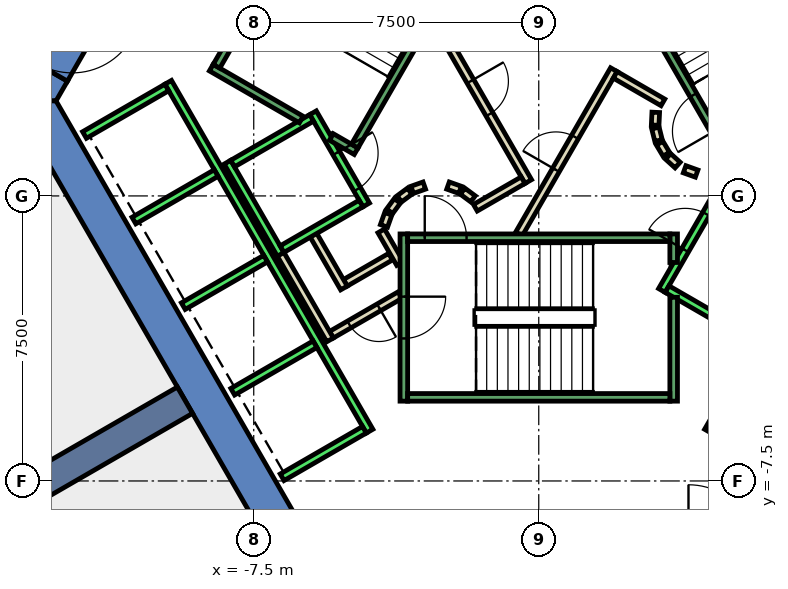
"""IFC4 building model, lengths in metres.
Left out: names, types, materials, properties, quantities, classifications, styles, units other than length and angle.
Written with IfcOpenShell. Run it as: python <this file> out.ifc"""

import sys

from ifc_helpers import new_model, si_unit, direction, frame, frame_2d, origin, place, context, subcontext, project, spatial, polyline, rectangle, outline, extrude, element, fill, save


model = new_model("IFC4")
c1 = context("Model", 3, precision=1e-05, world=origin(), true_north=direction((0.0, 1.0)))
c2 = subcontext(c1, "Body", "Model", "MODEL_VIEW")
j1 = project(units=[si_unit("LENGTHUNIT", "METRE"), si_unit("PLANEANGLEUNIT", "RADIAN")], contexts=[c1])
p1 = place(None, origin())
s1 = spatial("IfcSite", under=j1, at=p1, CompositionType="ELEMENT")
p2 = place(p1, origin())
s2 = spatial("IfcBuilding", under=s1, at=p2, CompositionType="ELEMENT")
p3 = place(p2, frame((0.0, 0.0, 56.0)))
s3 = spatial("IfcBuildingStorey", under=s2, at=p3, CompositionType="ELEMENT", Elevation=56.0)
p4 = place(p3, frame((0.0, 0.0, -0.4)))
e1 = element("IfcWall", 1, at=p4, inside=s3, PredefinedType="SHEAR", context=c2, shape_type="SweptSolid", body=[
    extrude(outline(polyline([(-12.402, 3.02), (-13.267, 3.52), (-13.856, 2.5), (-12.702, 2.5), (-12.402, 3.02)])), origin(), (0.0, 0.0, 1.0), 4.2),
])
p5 = place(p3, frame((0.0, 0.0, 3.6)))
e2 = element("IfcWall", 2, at=p5, inside=s3, PredefinedType="SHEAR", context=c2, shape_type="SweptSolid", body=[
    extrude(outline(polyline([(-13.267, 3.52), (-12.402, 3.02), (-11.402, 4.752), (-12.267, 5.252), (-13.267, 3.52)])), origin(), (0.0, 0.0, 1.0), 0.2),
])
p6 = place(p3, frame((0.0, 0.0, -0.4)))
e3 = element("IfcWall", 3, at=p6, inside=s3, PredefinedType="SHEAR", context=c2, shape_type="SweptSolid", body=[
    extrude(outline(polyline([(-13.856, 2.5), (-6.928, -9.5), (-6.351, -8.5), (-12.702, 2.5), (-13.856, 2.5)])), origin(), (0.0, 0.0, 1.0), 4.2),
])
p7 = place(p3, frame((-9.31, -5.375, -0.4), z_axis=(0.0, 0.0, 1.0), x_axis=(-0.866017533419, -0.500013631625, 0.0)))
e4 = element("IfcWall", 4, at=p7, inside=s3, PredefinedType="SHEAR", context=c2, shape_type="SweptSolid", body=[
    extrude(rectangle(XDim=9.0, YDim=0.8, at=frame_2d((4.5, 0.0))), origin(), (0.0, 0.0, 1.0), 4.2),
])
p8 = place(p3, frame((-3.9, -1.599, 0.0), z_axis=(0.0, 0.0, 1.0), x_axis=(-0.865969445389, -0.500096910261, 0.0)))
e5 = element("IfcWall", 5, at=p8, inside=s3, PredefinedType="PARTITIONING", context=c2, shape_type="SweptSolid", body=[
    extrude(rectangle(XDim=1.373, YDim=0.2, at=frame_2d((0.687, 0.0))), origin(), (0.0, 0.0, 1.0), 3.8),
])
p9 = place(p3, frame((-5.126, -2.422, 0.0), z_axis=(0.0, 0.0, 1.0), x_axis=(-0.500062241894, 0.865989465428, 0.0)))
e6 = element("IfcWall", 6, at=p9, inside=s3, PredefinedType="PARTITIONING", context=c2, shape_type="SweptSolid", body=[
    extrude(rectangle(XDim=1.7, YDim=0.2, at=frame_2d((0.85, 0.0))), origin(), (0.0, 0.0, 1.0), 3.8),
])
p10 = place(p3, frame((-3.65, -2.61, 0.0), z_axis=(0.0, 0.0, 1.0), x_axis=(-0.866072462134, -0.499918483688, 0.0)))
e7 = element("IfcWall", 7, at=p10, inside=s3, PredefinedType="PARTITIONING", context=c2, shape_type="SweptSolid", body=[
    extrude(rectangle(XDim=2.084, YDim=0.2, at=frame_2d((1.042, 0.0))), origin(), (0.0, 0.0, 1.0), 3.8),
])
p11 = place(p10, frame((0.642, 0.0, 0.0)))
e8 = element("IfcOpeningElement", 8, at=p11, cuts=e7, PredefinedType="OPENING", context=c2, shape_type="SweptSolid", body=[
    extrude(rectangle(XDim=0.9, YDim=2.1, at=frame_2d((0.45, 1.05))), frame((0.0, 0.11, 0.0), z_axis=(0.0, -1.0, 0.0), x_axis=(1.0, 0.0, 0.0)), (0.0, 0.0, 1.0), 0.22),
])
p12 = place(p3, frame((-5.492, -3.788, 0.0), z_axis=(0.0, 0.0, 1.0), x_axis=(-0.500008949224, 0.866020236886, 0.0)))
e9 = element("IfcWall", 9, at=p12, inside=s3, PredefinedType="PARTITIONING", context=c2, shape_type="SweptSolid", body=[
    extrude(rectangle(XDim=2.68, YDim=0.2, at=frame_2d((1.34, 0.0))), origin(), (0.0, 0.0, 1.0), 3.8),
])
p13 = place(p3, frame((-4.145, -0.92, 0.0), z_axis=(0.0, 0.0, 1.0), x_axis=(0.499743786207, -0.866173278362, 0.0)))
e10 = element("IfcWall", 10, at=p13, inside=s3, PredefinedType="PARTITIONING", context=c2, shape_type="SweptSolid", body=[
    extrude(rectangle(XDim=0.991, YDim=0.2, at=frame_2d((0.495, 0.0))), origin(), (0.0, 0.0, 1.0), 3.8),
])
p14 = place(p3, frame((-0.52, -1.0, 0.0), z_axis=(0.0, 0.0, 1.0), x_axis=(0.50011622646, 0.865958290007, 0.0)))
e11 = element("IfcWall", 11, at=p14, inside=s3, PredefinedType="PARTITIONING", context=c2, shape_type="SweptSolid", body=[
    extrude(rectangle(XDim=4.991, YDim=0.2, at=frame_2d((2.496, 0.0))), origin(), (0.0, 0.0, 1.0), 3.8),
])
p15 = place(p14, frame((1.945, 0.0, 0.0)))
e12 = element("IfcOpeningElement", 12, at=p15, cuts=e11, PredefinedType="OPENING", context=c2, shape_type="SweptSolid", body=[
    extrude(rectangle(XDim=1.0, YDim=2.1, at=frame_2d((0.5, 1.05))), frame((0.0, 0.11, 0.0), z_axis=(0.0, -1.0, 0.0), x_axis=(1.0, 0.0, 0.0)), (0.0, 0.0, 1.0), 0.22),
])
p16 = place(p3, frame((2.012, 3.186, 0.0), z_axis=(0.0, 0.0, 1.0), x_axis=(0.865891012941, -0.500232699559, 0.0)))
e13 = element("IfcWall", 13, at=p16, inside=s3, PredefinedType="PARTITIONING", context=c2, shape_type="SweptSolid", body=[
    extrude(rectangle(XDim=1.449, YDim=0.2, at=frame_2d((0.725, 0.0))), origin(), (0.0, 0.0, 1.0), 3.8),
])
p17 = place(p3, frame((3.079, 2.199, 0.0), z_axis=(0.0, 0.0, 1.0), x_axis=(-0.047771483479, -0.998858290933, 0.0)))
e14 = element("IfcWall", 14, at=p17, inside=s3, PredefinedType="PARTITIONING", context=c2, shape_type="SweptSolid", body=[
    extrude(rectangle(XDim=0.337, YDim=0.2, at=frame_2d((0.169, 0.0))), origin(), (0.0, 0.0, 1.0), 3.8),
])
p18 = place(p3, frame((3.07, 1.786, 0.0), z_axis=(0.0, 0.0, 1.0), x_axis=(0.242705583207, -0.970099994784, 0.0)))
e15 = element("IfcWall", 15, at=p18, inside=s3, PredefinedType="PARTITIONING", context=c2, shape_type="SweptSolid", body=[
    extrude(rectangle(XDim=0.338, YDim=0.2, at=frame_2d((0.169, 0.0))), origin(), (0.0, 0.0, 1.0), 3.8),
])
for number, where, z_axis, x_axis in (
    (16, (3.182, 1.388, 0.0), (0.0, 0.0, 1.0), (0.512, -0.859, 0.0)),
    (17, (3.404, 1.039, 0.0), (0.0, 0.0, 1.0), (0.74, -0.672, 0.0)),
):
    element("IfcWall", number, at=place(p3, frame(where, z_axis=z_axis, x_axis=x_axis)), inside=s3, PredefinedType="PARTITIONING", context=c2, shape_type="SweptSolid", body=[
        extrude(rectangle(XDim=0.338, YDim=0.2, at=frame_2d((0.169, 0.0))), origin(), (0.0, 0.0, 1.0), 3.8),
    ])
p19 = place(p3, frame((3.838, 0.702, 0.0), z_axis=(0.0, 0.0, 1.0), x_axis=(0.941035081519, -0.338308993895, 0.0)))
e18 = element("IfcWall", 18, at=p19, inside=s3, PredefinedType="PARTITIONING", context=c2, shape_type="SweptSolid", body=[
    extrude(rectangle(XDim=0.337, YDim=0.2, at=frame_2d((0.168, 0.0))), origin(), (0.0, 0.0, 1.0), 3.8),
])
p20 = place(p3, frame((-2.771, 4.7, 0.0), z_axis=(0.0, 0.0, 1.0), x_axis=(0.499969479948, -0.866043023828, 0.0)))
e19 = element("IfcWall", 19, at=p20, inside=s3, PredefinedType="PARTITIONING", context=c2, shape_type="SweptSolid", body=[
    extrude(rectangle(XDim=4.99, YDim=0.2, at=frame_2d((2.495, 0.0))), origin(), (0.0, 0.0, 1.0), 3.8),
])
p21 = place(p20, frame((1.945, 0.0, 0.0)))
e20 = element("IfcOpeningElement", 20, at=p21, cuts=e19, PredefinedType="OPENING", context=c2, shape_type="SweptSolid", body=[
    extrude(rectangle(XDim=1.0, YDim=2.1, at=frame_2d((0.5, 1.05))), frame((0.0, 0.11, 0.0), z_axis=(0.0, -1.0, 0.0), x_axis=(1.0, 0.0, 0.0)), (0.0, 0.0, 1.0), 0.22),
])
p22 = place(p3, frame((-0.412, 0.414, 0.0), z_axis=(0.0, 0.0, 1.0), x_axis=(-0.866017369001, -0.500013916395, 0.0)))
e21 = element("IfcWall", 21, at=p22, inside=s3, PredefinedType="PARTITIONING", context=c2, shape_type="SweptSolid", body=[
    extrude(rectangle(XDim=1.45, YDim=0.2, at=frame_2d((0.725, 0.0))), origin(), (0.0, 0.0, 1.0), 3.8),
])
p23 = place(p3, frame((-1.731, -0.077, 0.0), z_axis=(0.0, 0.0, 1.0), x_axis=(-0.804311165252, 0.594208338422, 0.0)))
e22 = element("IfcWall", 22, at=p23, inside=s3, PredefinedType="PARTITIONING", context=c2, shape_type="SweptSolid", body=[
    extrude(rectangle(XDim=0.338, YDim=0.2, at=frame_2d((0.169, 0.0))), origin(), (0.0, 0.0, 1.0), 3.8),
])
p24 = place(p3, frame((-2.07, 0.16, 0.0), z_axis=(0.0, 0.0, 1.0), x_axis=(-0.942199461132, 0.335052496547, 0.0)))
e23 = element("IfcWall", 23, at=p24, inside=s3, PredefinedType="PARTITIONING", context=c2, shape_type="SweptSolid", body=[
    extrude(rectangle(XDim=0.337, YDim=0.2, at=frame_2d((0.169, 0.0))), origin(), (0.0, 0.0, 1.0), 3.8),
])
p25 = place(p3, frame((-3.012, 0.273, 0.0), z_axis=(0.0, 0.0, 1.0), x_axis=(-0.942280615813, -0.334824194261, 0.0)))
e24 = element("IfcWall", 24, at=p25, inside=s3, PredefinedType="PARTITIONING", context=c2, shape_type="SweptSolid", body=[
    extrude(rectangle(XDim=0.338, YDim=0.2, at=frame_2d((0.169, 0.0))), origin(), (0.0, 0.0, 1.0), 3.8),
])
p26 = place(p3, frame((-3.397, 0.124, 0.0), z_axis=(0.0, 0.0, 1.0), x_axis=(-0.804311165252, -0.594208338422, 0.0)))
e25 = element("IfcWall", 25, at=p26, inside=s3, PredefinedType="PARTITIONING", context=c2, shape_type="SweptSolid", body=[
    extrude(rectangle(XDim=0.338, YDim=0.2, at=frame_2d((0.169, 0.0))), origin(), (0.0, 0.0, 1.0), 3.8),
])
p27 = place(p3, frame((-3.723, -0.131, 0.0), z_axis=(0.0, 0.0, 1.0), x_axis=(-0.594675113454, -0.803966112121, 0.0)))
e26 = element("IfcWall", 26, at=p27, inside=s3, PredefinedType="PARTITIONING", context=c2, shape_type="SweptSolid", body=[
    extrude(rectangle(XDim=0.338, YDim=0.2, at=frame_2d((0.169, 0.0))), origin(), (0.0, 0.0, 1.0), 3.8),
])
p28 = place(p3, frame((-3.96, -0.47, 0.0), z_axis=(0.0, 0.0, 1.0), x_axis=(-0.334824194261, -0.942280615813, 0.0)))
e27 = element("IfcWall", 27, at=p28, inside=s3, PredefinedType="PARTITIONING", context=c2, shape_type="SweptSolid", body=[
    extrude(rectangle(XDim=0.338, YDim=0.2, at=frame_2d((0.169, 0.0))), origin(), (0.0, 0.0, 1.0), 3.8),
])
p29 = place(p3, frame((-12.18, 5.202, 0.0), z_axis=(0.0, 0.0, 1.0), x_axis=(-0.50002537861, -0.866010750942, 0.0)))
e28 = element("IfcWall", 28, at=p29, inside=s3, PredefinedType="PARTITIONING", context=c2, shape_type="SweptSolid", body=[
    extrude(rectangle(XDim=2.0, YDim=0.2, at=frame_2d((1.0, 0.0))), origin(), (0.0, 0.0, 1.0), 2.4),
])
p30 = place(p29, frame((0.19, 0.0, 0.0)))
e29 = element("IfcOpeningElement", 29, at=p30, cuts=e28, PredefinedType="OPENING", context=c2, shape_type="SweptSolid", body=[
    extrude(rectangle(XDim=1.8, YDim=2.1, at=frame_2d((0.9, 1.05))), frame((0.0, 0.11, 0.0), z_axis=(0.0, -1.0, 0.0), x_axis=(1.0, 0.0, 0.0)), (0.0, 0.0, 1.0), 0.22),
])
p31 = place(p3, frame((-5.94, 2.188, 0.0), z_axis=(0.0, 0.0, 1.0), x_axis=(0.49994636267, -0.866056369097, 0.0)))
e30 = element("IfcWall", 30, at=p31, inside=s3, PredefinedType="STANDARD", context=c2, shape_type="SweptSolid", body=[
    extrude(rectangle(XDim=2.8, YDim=0.2, at=frame_2d((1.4, 0.0))), origin(), (0.0, 0.0, 1.0), 3.8),
])
p32 = place(p31, frame((1.225, 0.0, 0.0)))
e31 = element("IfcOpeningElement", 31, at=p32, cuts=e30, PredefinedType="OPENING", context=c2, shape_type="SweptSolid", body=[
    extrude(rectangle(XDim=1.1, YDim=2.1, at=frame_2d((0.55, 1.05))), frame((0.0, 0.11, 0.0), z_axis=(0.0, -1.0, 0.0), x_axis=(1.0, 0.0, 0.0)), (0.0, 0.0, 1.0), 0.22),
])
p33 = place(p3, frame((-8.192, 0.888, 0.0), z_axis=(0.0, 0.0, 1.0), x_axis=(0.49994636267, -0.866056369097, 0.0)))
e32 = element("IfcWall", 32, at=p33, inside=s3, PredefinedType="STANDARD", context=c2, shape_type="SweptSolid", body=[
    extrude(rectangle(XDim=2.8, YDim=0.2, at=frame_2d((1.4, 0.0))), origin(), (0.0, 0.0, 1.0), 3.8),
])
for number, where, z_axis, x_axis in (
    (33, (-5.977, 2.052, 0.0), (0.0, 0.0, 1.0), (-0.866, -0.5, 0.0)),
    (34, (-4.677, -0.2, 0.0), (0.0, 0.0, 1.0), (-0.866, -0.5, 0.0)),
):
    element("IfcWall", number, at=place(p3, frame(where, z_axis=z_axis, x_axis=x_axis)), inside=s3, PredefinedType="STANDARD", context=c2, shape_type="SweptSolid", body=[
        extrude(rectangle(XDim=2.399, YDim=0.2, at=frame_2d((1.2, 0.0))), origin(), (0.0, 0.0, 1.0), 3.8),
    ])
p34 = place(p3, frame((-9.751, 2.99, 0.0), z_axis=(0.0, 0.0, 1.0), x_axis=(0.50000090737, -0.866024879913, 0.0)))
e35 = element("IfcWall", 35, at=p34, inside=s3, PredefinedType="STANDARD", context=c2, shape_type="SweptSolid", body=[
    extrude(rectangle(XDim=10.6, YDim=0.2, at=frame_2d((5.3, 0.0))), origin(), (0.0, 0.0, 1.0), 3.8),
])
p35 = place(p3, frame((-9.788, 2.853, 0.0), z_axis=(0.0, 0.0, 1.0), x_axis=(-0.865998541277, -0.500046524342, 0.0)))
e36 = element("IfcWall", 36, at=p35, inside=s3, PredefinedType="STANDARD", context=c2, shape_type="SweptSolid", body=[
    extrude(rectangle(XDim=2.5, YDim=0.2, at=frame_2d((1.25, 0.0))), origin(), (0.0, 0.0, 1.0), 3.8),
])
for number, where, z_axis, x_axis in (
    (37, (-8.488, 0.602, 0.0), (0.0, 0.0, 1.0), (-0.866, -0.5, 0.0)),
    (38, (-7.188, -1.65, 0.0), (0.0, 0.0, 1.0), (-0.866, -0.5, 0.0)),
    (39, (-5.888, -3.902, 0.0), (0.0, 0.0, 1.0), (-0.866, -0.5, 0.0)),
    (40, (-4.588, -6.153, 0.0), (0.0, 0.0, 1.0), (-0.866, -0.5, 0.0)),
):
    element("IfcWall", number, at=place(p3, frame(where, z_axis=z_axis, x_axis=x_axis)), inside=s3, PredefinedType="STANDARD", context=c2, shape_type="SweptSolid", body=[
        extrude(rectangle(XDim=2.5, YDim=0.2, at=frame_2d((1.25, 0.0))), origin(), (0.0, 0.0, 1.0), 3.8),
    ])
p36 = place(p3, frame((3.24, -2.488, 0.0), z_axis=(0.0, 0.0, 1.0), x_axis=(0.49994636267, 0.866056369097, 0.0)))
e41 = element("IfcWall", 41, at=p36, inside=s3, PredefinedType="STANDARD", context=c2, shape_type="SweptSolid", body=[
    extrude(rectangle(XDim=2.8, YDim=0.2, at=frame_2d((1.4, 0.0))), origin(), (0.0, 0.0, 1.0), 3.8),
])
p37 = place(p36, frame((1.225, 0.0, 0.0)))
e42 = element("IfcOpeningElement", 42, at=p37, cuts=e41, PredefinedType="OPENING", context=c2, shape_type="SweptSolid", body=[
    extrude(rectangle(XDim=1.1, YDim=2.1, at=frame_2d((0.55, 1.05))), frame((0.0, 0.11, 0.0), z_axis=(0.0, -1.0, 0.0), x_axis=(1.0, 0.0, 0.0)), (0.0, 0.0, 1.0), 0.22),
])
p38 = place(p3, frame((3.377, -2.452, 0.0), z_axis=(0.0, 0.0, 1.0), x_axis=(0.865955154139, -0.50012165622, 0.0)))
e43 = element("IfcWall", 43, at=p38, inside=s3, PredefinedType="STANDARD", context=c2, shape_type="SweptSolid", body=[
    extrude(rectangle(XDim=2.4, YDim=0.2, at=frame_2d((1.2, 0.0))), origin(), (0.0, 0.0, 1.0), 3.8),
])
p39 = place(p3, frame((4.451, -6.19, 0.0), z_axis=(0.0, 0.0, 1.0), x_axis=(0.50000090737, 0.866024879913, 0.0)))
e44 = element("IfcWall", 44, at=p39, inside=s3, PredefinedType="STANDARD", context=c2, shape_type="SweptSolid", body=[
    extrude(rectangle(XDim=10.6, YDim=0.2, at=frame_2d((5.3, 0.0))), origin(), (0.0, 0.0, 1.0), 3.8),
])
p40 = place(p3, frame((-3.55, -1.0, 0.0), z_axis=(0.0, 0.0, 1.0), x_axis=(0.0, -1.0, 0.0)))
e45 = element("IfcWall", 45, at=p40, inside=s3, PredefinedType="STANDARD", context=c2, shape_type="SweptSolid", body=[
    extrude(rectangle(XDim=4.4, YDim=0.2, at=frame_2d((2.2, 0.0))), origin(), (0.0, 0.0, 1.0), 3.8),
])
p41 = place(p40, frame((1.65, 0.0, 0.0)))
e46 = element("IfcOpeningElement", 46, at=p41, cuts=e45, PredefinedType="OPENING", context=c2, shape_type="SweptSolid", body=[
    extrude(rectangle(XDim=1.1, YDim=2.2, at=frame_2d((0.55, 1.1))), frame((0.0, 0.11, 0.0), z_axis=(0.0, -1.0, 0.0), x_axis=(1.0, 0.0, 0.0)), (0.0, 0.0, 1.0), 0.22),
])
p42 = place(p3, frame((3.55, -2.667, 0.0), z_axis=(0.0, 0.0, 1.0), x_axis=(0.0, -1.0, 0.0)))
e47 = element("IfcWall", 47, at=p42, inside=s3, PredefinedType="STANDARD", context=c2, shape_type="SweptSolid", body=[
    extrude(rectangle(XDim=2.733, YDim=0.2, at=frame_2d((1.366, 0.0))), origin(), (0.0, 0.0, 1.0), 3.8),
])
p43 = place(p3, frame((3.55, -1.0, 0.0), z_axis=(0.0, 0.0, 1.0), x_axis=(0.0, -1.0, 0.0)))
e48 = element("IfcWall", 48, at=p43, inside=s3, PredefinedType="STANDARD", context=c2, shape_type="SweptSolid", body=[
    extrude(rectangle(XDim=0.751, YDim=0.2, at=frame_2d((0.375, 0.0))), origin(), (0.0, 0.0, 1.0), 3.8),
])
p44 = place(p3, frame((-3.45, -1.1, 0.0), z_axis=(0.0, 0.0, 1.0), x_axis=(1.0, 0.0, 0.0)))
e49 = element("IfcWall", 49, at=p44, inside=s3, PredefinedType="STANDARD", context=c2, shape_type="SweptSolid", body=[
    extrude(rectangle(XDim=6.9, YDim=0.2, at=frame_2d((3.45, 0.0))), origin(), (0.0, 0.0, 1.0), 3.8),
])
p45 = place(p44, frame((0.45, 0.0, 0.0)))
e50 = element("IfcOpeningElement", 50, at=p45, cuts=e49, PredefinedType="OPENING", context=c2, shape_type="SweptSolid", body=[
    extrude(rectangle(XDim=1.1, YDim=2.2, at=frame_2d((0.55, 1.1))), frame((0.0, 0.11, 0.0), z_axis=(0.0, -1.0, 0.0), x_axis=(1.0, 0.0, 0.0)), (0.0, 0.0, 1.0), 0.22),
])
p46 = place(p3, frame((-3.45, -5.3, 0.0), z_axis=(0.0, 0.0, 1.0), x_axis=(1.0, 0.0, 0.0)))
e51 = element("IfcWall", 51, at=p46, inside=s3, PredefinedType="STANDARD", context=c2, shape_type="SweptSolid", body=[
    extrude(rectangle(XDim=6.9, YDim=0.2, at=frame_2d((3.45, 0.0))), origin(), (0.0, 0.0, 1.0), 3.8),
])
p47 = place(p3, frame((4.843, 1.312, 0.0), z_axis=(0.0, 0.0, 1.0), x_axis=(-0.499963383562, 0.866046543262, 0.0)))
e52 = element("IfcWall", 52, at=p47, inside=s3, PredefinedType="STANDARD", context=c2, shape_type="SweptSolid", body=[
    extrude(rectangle(XDim=6.9, YDim=0.2, at=frame_2d((3.45, 0.0))), origin(), (0.0, 0.0, 1.0), 3.8),
])
p48 = place(p47, frame((0.45, 0.0, 0.0)))
e53 = element("IfcOpeningElement", 53, at=p48, cuts=e52, PredefinedType="OPENING", context=c2, shape_type="SweptSolid", body=[
    extrude(rectangle(XDim=1.1, YDim=2.2, at=frame_2d((0.55, 1.1))), frame((0.0, 0.11, 0.0), z_axis=(0.0, -1.0, 0.0), x_axis=(1.0, 0.0, 0.0)), (0.0, 0.0, 1.0), 0.22),
])
p49 = place(p3, frame((-6.25, 2.01, 0.0), z_axis=(0.0, 0.0, 1.0), x_axis=(-0.86611865017, 0.499838457731, 0.0)))
e54 = element("IfcWall", 54, at=p49, inside=s3, PredefinedType="STANDARD", context=c2, shape_type="SweptSolid", body=[
    extrude(rectangle(XDim=2.733, YDim=0.2, at=frame_2d((1.366, 0.0))), origin(), (0.0, 0.0, 1.0), 3.8),
])
p50 = place(p3, frame((-4.806, 1.176, 0.0), z_axis=(0.0, 0.0, 1.0), x_axis=(-0.866558586415, 0.499075361355, 0.0)))
e55 = element("IfcWall", 55, at=p50, inside=s3, PredefinedType="STANDARD", context=c2, shape_type="SweptSolid", body=[
    extrude(rectangle(XDim=0.751, YDim=0.2, at=frame_2d((0.376, 0.0))), origin(), (0.0, 0.0, 1.0), 3.8),
])
p51 = place(p3, frame((-1.393, 7.288, 0.0), z_axis=(0.0, 0.0, 1.0), x_axis=(-0.499963383562, -0.866046543262, 0.0)))
e56 = element("IfcWall", 56, at=p51, inside=s3, PredefinedType="STANDARD", context=c2, shape_type="SweptSolid", body=[
    extrude(rectangle(XDim=6.9, YDim=0.2, at=frame_2d((3.45, 0.0))), origin(), (0.0, 0.0, 1.0), 3.8),
])
p52 = place(p51, frame((0.45, 0.0, 0.0)))
e57 = element("IfcOpeningElement", 57, at=p52, cuts=e56, PredefinedType="OPENING", context=c2, shape_type="SweptSolid", body=[
    extrude(rectangle(XDim=1.1, YDim=2.2, at=frame_2d((0.55, 1.1))), frame((0.0, 0.11, 0.0), z_axis=(0.0, -1.0, 0.0), x_axis=(1.0, 0.0, 0.0)), (0.0, 0.0, 1.0), 0.22),
])
p53 = place(p3, frame((-5.03, 9.388, 0.0), z_axis=(0.0, 0.0, 1.0), x_axis=(-0.499978703459, -0.866037698999, 0.0)))
e58 = element("IfcWall", 58, at=p53, inside=s3, PredefinedType="STANDARD", context=c2, shape_type="SweptSolid", body=[
    extrude(rectangle(XDim=6.9, YDim=0.2, at=frame_2d((3.45, 0.0))), origin(), (0.0, 0.0, 1.0), 3.8),
])
p54 = place(p15, origin())
e59 = element("IfcDoor", 59, at=p54, inside=s3, OperationType="SINGLE_SWING_LEFT", PredefinedType="DOOR", context=c2, shape_type="SweptSolid", body=[
    extrude(rectangle(XDim=1.0, YDim=2.1, at=frame_2d((0.5, 1.05))), frame((0.0, 0.025, 0.0), z_axis=(0.0, -1.0, 0.0), x_axis=(1.0, 0.0, 0.0)), (0.0, 0.0, 1.0), 0.05),
])
fill(e12, e59)
p55 = place(p21, origin())
e60 = element("IfcDoor", 60, at=p55, inside=s3, OperationType="SINGLE_SWING_RIGHT", PredefinedType="DOOR", context=c2, shape_type="SweptSolid", body=[
    extrude(rectangle(XDim=1.0, YDim=2.1, at=frame_2d((0.5, 1.05))), frame((0.0, 0.025, 0.0), z_axis=(0.0, -1.0, 0.0), x_axis=(1.0, 0.0, 0.0)), (0.0, 0.0, 1.0), 0.05),
])
fill(e20, e60)
p56 = place(p11, origin())
e61 = element("IfcDoor", 61, at=p56, inside=s3, OperationType="SINGLE_SWING_LEFT", PredefinedType="DOOR", context=c2, shape_type="SweptSolid", body=[
    extrude(rectangle(XDim=0.9, YDim=2.1, at=frame_2d((0.45, 1.05))), frame((0.0, 0.025, 0.0), z_axis=(0.0, -1.0, 0.0), x_axis=(1.0, 0.0, 0.0)), (0.0, 0.0, 1.0), 0.05),
])
fill(e8, e61)
p57 = place(p30, origin())
e62 = element("IfcDoor", 62, at=p57, inside=s3, OperationType="DOUBLE_DOOR_SINGLE_SWING", PredefinedType="DOOR", context=c2, shape_type="SweptSolid", body=[
    extrude(rectangle(XDim=1.8, YDim=2.1, at=frame_2d((0.9, 1.05))), frame((0.0, 0.025, 0.0), z_axis=(0.0, -1.0, 0.0), x_axis=(1.0, 0.0, 0.0)), (0.0, 0.0, 1.0), 0.05),
])
fill(e29, e62)
p58 = place(p37, origin())
e63 = element("IfcDoor", 63, at=p58, inside=s3, OperationType="SLIDING_TO_LEFT", PredefinedType="DOOR", context=c2, shape_type="SweptSolid", body=[
    extrude(rectangle(XDim=1.1, YDim=2.1, at=frame_2d((0.55, 1.05))), frame((0.0, 0.025, 0.0), z_axis=(0.0, -1.0, 0.0), x_axis=(1.0, 0.0, 0.0)), (0.0, 0.0, 1.0), 0.05),
])
fill(e42, e63)
p59 = place(p32, origin())
e64 = element("IfcDoor", 64, at=p59, inside=s3, OperationType="SLIDING_TO_LEFT", PredefinedType="DOOR", context=c2, shape_type="SweptSolid", body=[
    extrude(rectangle(XDim=1.1, YDim=2.1, at=frame_2d((0.55, 1.05))), frame((0.0, 0.025, 0.0), z_axis=(0.0, -1.0, 0.0), x_axis=(1.0, 0.0, 0.0)), (0.0, 0.0, 1.0), 0.05),
])
fill(e31, e64)
p60 = place(p45, origin())
e65 = element("IfcDoor", 65, at=p60, inside=s3, OperationType="SINGLE_SWING_LEFT", PredefinedType="DOOR", context=c2, shape_type="SweptSolid", body=[
    extrude(rectangle(XDim=1.1, YDim=2.2, at=frame_2d((0.55, 1.1))), frame((0.0, 0.025, 0.0), z_axis=(0.0, -1.0, 0.0), x_axis=(1.0, 0.0, 0.0)), (0.0, 0.0, 1.0), 0.05),
])
fill(e50, e65)
p61 = place(p41, origin())
e66 = element("IfcDoor", 66, at=p61, inside=s3, OperationType="SINGLE_SWING_LEFT", PredefinedType="DOOR", context=c2, shape_type="SweptSolid", body=[
    extrude(rectangle(XDim=1.1, YDim=2.2, at=frame_2d((0.55, 1.1))), frame((0.0, 0.025, 0.0), z_axis=(0.0, -1.0, 0.0), x_axis=(1.0, 0.0, 0.0)), (0.0, 0.0, 1.0), 0.05),
])
fill(e46, e66)
p62 = place(p48, origin())
e67 = element("IfcDoor", 67, at=p62, inside=s3, OperationType="SINGLE_SWING_LEFT", PredefinedType="DOOR", context=c2, shape_type="SweptSolid", body=[
    extrude(rectangle(XDim=1.1, YDim=2.2, at=frame_2d((0.55, 1.1))), frame((0.0, 0.025, 0.0), z_axis=(0.0, -1.0, 0.0), x_axis=(1.0, 0.0, 0.0)), (0.0, 0.0, 1.0), 0.05),
])
fill(e53, e67)
save(model, sys.argv[1])
